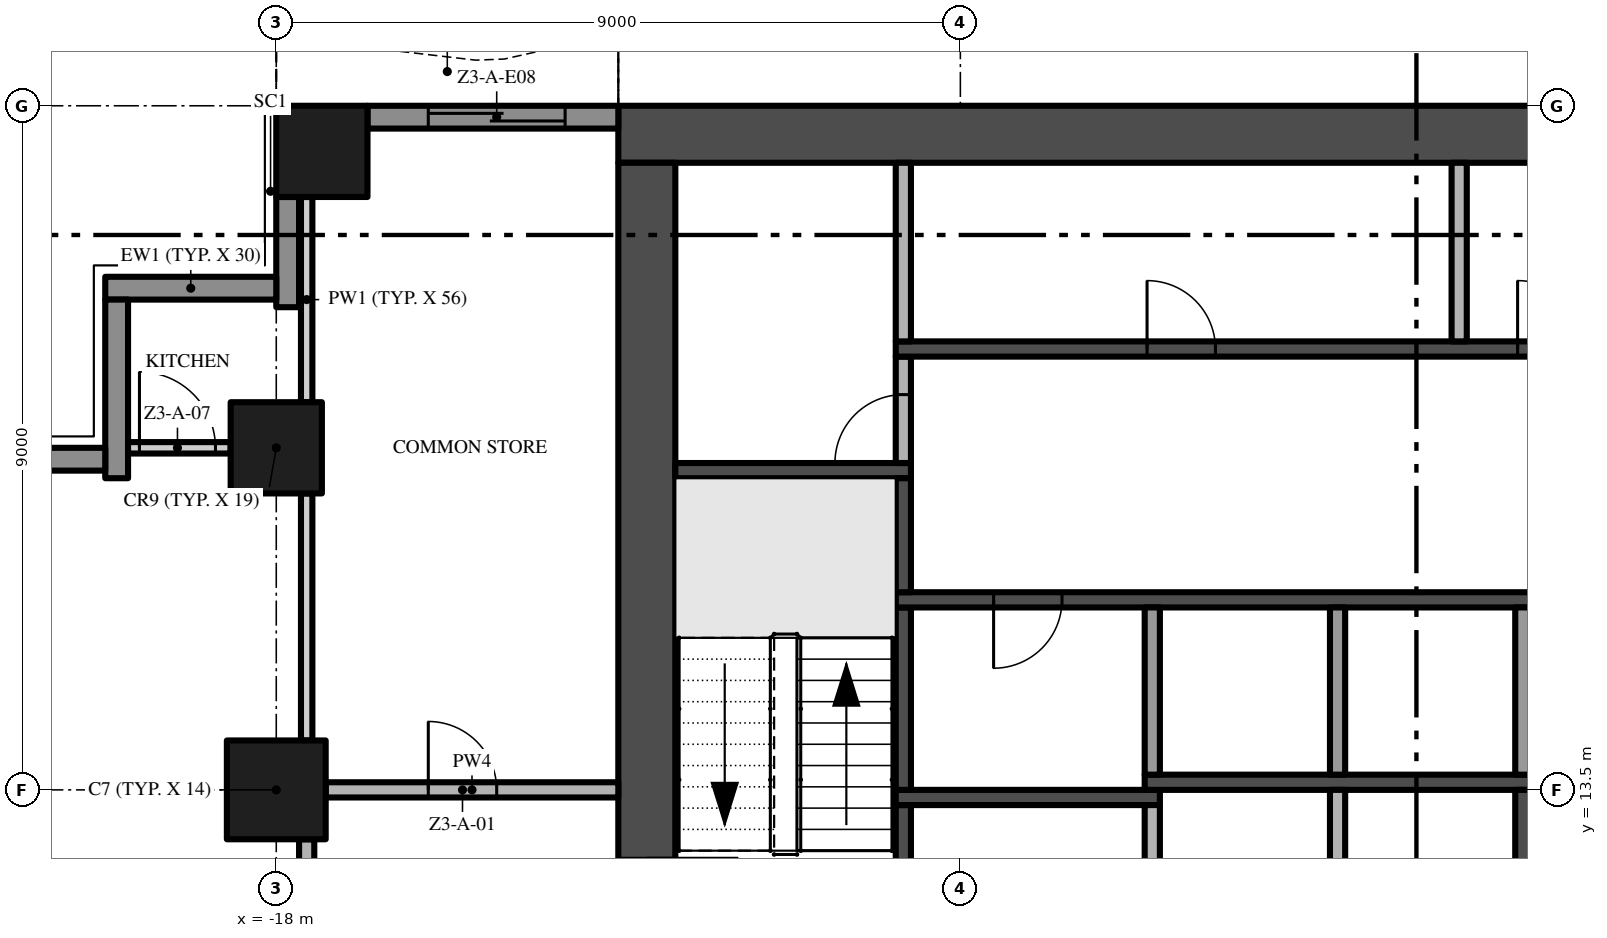
"""IFC4 building model, lengths in metres.
Left out: names, types, materials, properties, quantities, classifications, styles, units other than length and angle.
Written with IfcOpenShell. Run it as: python <this file> out.ifc"""

import sys

from ifc_helpers import new_model, si_unit, direction, frame, frame_2d, origin, origin_2d, place, context, subcontext, project, spatial, polyline, rectangle, outline, extrude, element, fill, save


model = new_model("IFC4")
c1 = context("Model", 3, precision=1e-05, world=origin(), true_north=direction((0.0, 1.0)))
c2 = subcontext(c1, "Body", "Model", "MODEL_VIEW")
j1 = project(units=[si_unit("LENGTHUNIT", "METRE"), si_unit("PLANEANGLEUNIT", "RADIAN")], contexts=[c1])
p1 = place(None, origin())
s1 = spatial("IfcSite", under=j1, at=p1, CompositionType="ELEMENT")
p2 = place(p1, origin())
s2 = spatial("IfcBuilding", under=s1, at=p2, CompositionType="ELEMENT")
p3 = place(p2, frame((0.0, 0.0, 132.6)))
s3 = spatial("IfcBuildingStorey", under=s2, at=p3, CompositionType="ELEMENT", Elevation=132.6)
p4 = place(p3, frame((13.5, 22.125, -0.3), z_axis=(0.0, 0.0, 1.0), x_axis=(-1.0, 0.0, 0.0)))
e1 = element("IfcWall", 1, at=p4, inside=s3, PredefinedType="SHEAR", context=c2, shape_type="SweptSolid", body=[
    extrude(rectangle(XDim=27.0, YDim=0.75, at=frame_2d((13.5, 0.0))), origin(), (0.0, 0.0, 1.0), 3.8),
])
p5 = place(p3, frame((-13.125, 21.75, -0.3), z_axis=(0.0, 0.0, 1.0), x_axis=(0.0, -1.0, 0.0)))
e2 = element("IfcWall", 2, at=p5, inside=s3, PredefinedType="SHEAR", context=c2, shape_type="SweptSolid", body=[
    extrude(rectangle(XDim=16.5, YDim=0.75, at=frame_2d((8.25, 0.0))), origin(), (0.0, 0.0, 1.0), 3.8),
])
p6 = place(p5, frame((9.15, 0.0, 0.3)))
e3 = element("IfcOpeningElement", 3, at=p6, cuts=e2, PredefinedType="OPENING", context=c2, shape_type="SweptSolid", body=[
    extrude(rectangle(XDim=1.2, YDim=2.2, at=frame_2d((0.6, 1.1))), frame((0.0, 0.385, 0.0), z_axis=(0.0, -1.0, 0.0), x_axis=(1.0, 0.0, 0.0)), (0.0, 0.0, 1.0), 0.77),
])
p7 = place(p3, frame((-18.0, 13.5, 0.0), z_axis=(0.0, 0.0, 1.0), x_axis=(1.0, 0.0, 0.0)))
e4 = element("IfcColumn", 4, at=p7, inside=s3, PredefinedType="COLUMN", context=c2, shape_type="SweptSolid", body=[
    extrude(rectangle(XDim=1.3, YDim=1.3, at=origin_2d()), origin(), (0.0, 0.0, 1.0), 3.5),
])
for number, where, z_axis, x_axis in (
    (5, (-17.4, 21.9, 0.0), (0.0, 0.0, 1.0), (1.0, 0.0, 0.0)),
    (6, (-18.0, 18.0, 0.0), (0.0, 0.0, 1.0), (1.0, 0.0, 0.0)),
):
    element("IfcColumn", number, at=place(p3, frame(where, z_axis=z_axis, x_axis=x_axis)), inside=s3, PredefinedType="COLUMN", context=c2, shape_type="SweptSolid", body=[
        extrude(rectangle(XDim=1.2, YDim=1.2, at=origin_2d()), origin(), (0.0, 0.0, 1.0), 3.5),
    ])
p8 = place(p3, frame((-16.8, 22.35, 0.0), z_axis=(0.0, 0.0, 1.0), x_axis=(1.0, 0.0, 0.0)))
e7 = element("IfcWall", 7, at=p8, inside=s3, PredefinedType="SOLIDWALL", context=c2, shape_type="SweptSolid", body=[
    extrude(rectangle(XDim=3.3, YDim=0.3, at=frame_2d((1.65, 0.0))), origin(), (0.0, 0.0, 1.0), 3.5),
])
p9 = place(p8, frame((0.8, 0.0, 0.0)))
e8 = element("IfcOpeningElement", 8, at=p9, cuts=e7, PredefinedType="OPENING", context=c2, shape_type="SweptSolid", body=[
    extrude(rectangle(XDim=1.8, YDim=2.4, at=frame_2d((0.9, 1.2))), frame((0.0, 0.16, 0.0), z_axis=(0.0, -1.0, 0.0), x_axis=(1.0, 0.0, 0.0)), (0.0, 0.0, 1.0), 0.32),
])
p10 = place(p3, frame((-17.85, 19.85, 0.0), z_axis=(0.0, 0.0, 1.0), x_axis=(0.0, 1.0, 0.0)))
e9 = element("IfcWall", 9, at=p10, inside=s3, PredefinedType="SOLIDWALL", context=c2, shape_type="SweptSolid", body=[
    extrude(rectangle(XDim=1.45, YDim=0.3, at=frame_2d((0.725, 0.0))), origin(), (0.0, 0.0, 1.0), 3.5),
])
p11 = place(p3, frame((-20.25, 20.1, 0.0), z_axis=(0.0, 0.0, 1.0), x_axis=(1.0, 0.0, 0.0)))
e10 = element("IfcWall", 10, at=p11, inside=s3, PredefinedType="SOLIDWALL", context=c2, shape_type="SweptSolid", body=[
    extrude(rectangle(XDim=2.25, YDim=0.3, at=frame_2d((1.125, 0.0))), origin(), (0.0, 0.0, 1.0), 3.5),
])
p12 = place(p3, frame((-20.1, 17.6, 0.0), z_axis=(0.0, 0.0, 1.0), x_axis=(0.0, 1.0, 0.0)))
e11 = element("IfcWall", 11, at=p12, inside=s3, PredefinedType="SOLIDWALL", context=c2, shape_type="SweptSolid", body=[
    extrude(rectangle(XDim=2.35, YDim=0.3, at=frame_2d((1.175, 0.0))), origin(), (0.0, 0.0, 1.0), 3.5),
])
p13 = place(p3, frame((-22.5, 17.85, 0.0), z_axis=(0.0, 0.0, 1.0), x_axis=(1.0, 0.0, 0.0)))
e12 = element("IfcWall", 12, at=p13, inside=s3, PredefinedType="SOLIDWALL", context=c2, shape_type="SweptSolid", body=[
    extrude(rectangle(XDim=2.25, YDim=0.3, at=frame_2d((1.125, 0.0))), origin(), (0.0, 0.0, 1.0), 3.5),
])
p14 = place(p3, origin())
e13 = element("IfcWall", 13, at=p14, inside=s3, PredefinedType="USERDEFINED", context=c2, shape_type="SweptSolid", body=[
    extrude(outline(polyline([(-13.5, 23.451), (-15.0, 23.115), (-15.375, 23.1), (-16.5, 23.231), (-18.0, 23.755), (-18.083, 23.519), (-16.556, 22.986), (-15.385, 22.849), (-14.967, 22.866), (-13.445, 23.208), (-13.5, 23.451)])), origin(), (0.0, 0.0, 1.0), 0.9),
])
p15 = place(p3, frame((-12.75, 17.7, 0.0), z_axis=(0.0, 0.0, 1.0), x_axis=(1.0, 0.0, 0.0)))
e14 = element("IfcWall", 14, at=p15, inside=s3, PredefinedType="SHEAR", context=c2, shape_type="SweptSolid", body=[
    extrude(rectangle(XDim=3.1, YDim=0.2, at=frame_2d((1.55, 0.0))), origin(), (0.0, 0.0, 1.0), 3.5),
])
p16 = place(p3, frame((-9.75, 11.0, 0.0), z_axis=(0.0, 0.0, 1.0), x_axis=(0.0, 1.0, 0.0)))
e15 = element("IfcWall", 15, at=p16, inside=s3, PredefinedType="SHEAR", context=c2, shape_type="SweptSolid", body=[
    extrude(rectangle(XDim=2.3, YDim=0.2, at=frame_2d((1.15, 0.0))), origin(), (0.0, 0.0, 1.0), 3.5),
])
p17 = place(p3, frame((-9.85, 13.4, 0.0), z_axis=(0.0, 0.0, 1.0), x_axis=(1.0, 0.0, 0.0)))
e16 = element("IfcWall", 16, at=p17, inside=s3, PredefinedType="SHEAR", context=c2, shape_type="SweptSolid", body=[
    extrude(rectangle(XDim=3.475, YDim=0.2, at=frame_2d((1.738, 0.0))), origin(), (0.0, 0.0, 1.0), 3.5),
])
p18 = place(p3, frame((-9.75, 13.5, 0.0), z_axis=(0.0, 0.0, 1.0), x_axis=(0.0, 1.0, 0.0)))
e17 = element("IfcWall", 17, at=p18, inside=s3, PredefinedType="SHEAR", context=c2, shape_type="SweptSolid", body=[
    extrude(rectangle(XDim=2.4, YDim=0.2, at=frame_2d((1.2, 0.0))), origin(), (0.0, 0.0, 1.0), 3.5),
])
p19 = place(p3, frame((-1.5, 16.0, 0.0), z_axis=(0.0, 0.0, 1.0), x_axis=(-1.0, 0.0, 0.0)))
e18 = element("IfcWall", 18, at=p19, inside=s3, PredefinedType="SHEAR", context=c2, shape_type="SweptSolid", body=[
    extrude(rectangle(XDim=8.35, YDim=0.2, at=frame_2d((4.175, 0.0))), origin(), (0.0, 0.0, 1.0), 3.5),
])
p20 = place(p19, frame((6.162, 0.0, 0.0)))
e19 = element("IfcOpeningElement", 19, at=p20, cuts=e18, PredefinedType="OPENING", context=c2, shape_type="SweptSolid", body=[
    extrude(rectangle(XDim=0.9, YDim=2.1, at=frame_2d((0.45, 1.05))), frame((0.0, 0.11, 0.0), z_axis=(0.0, -1.0, 0.0), x_axis=(1.0, 0.0, 0.0)), (0.0, 0.0, 1.0), 0.22),
])
p21 = place(p3, frame((-9.75, 16.1, 0.0), z_axis=(0.0, 0.0, 1.0), x_axis=(0.0, 1.0, 0.0)))
e20 = element("IfcWall", 20, at=p21, inside=s3, PredefinedType="SHEAR", context=c2, shape_type="SweptSolid", body=[
    extrude(rectangle(XDim=1.5, YDim=0.2, at=frame_2d((0.75, 0.0))), origin(), (0.0, 0.0, 1.0), 3.5),
])
p22 = place(p3, frame((-9.75, 17.8, 0.0), z_axis=(0.0, 0.0, 1.0), x_axis=(0.0, 1.0, 0.0)))
e21 = element("IfcWall", 21, at=p22, inside=s3, PredefinedType="PARTITIONING", context=c2, shape_type="SweptSolid", body=[
    extrude(rectangle(XDim=1.4, YDim=0.2, at=frame_2d((0.7, 0.0))), origin(), (0.0, 0.0, 1.0), 3.5),
])
p23 = place(p22, origin())
e22 = element("IfcOpeningElement", 22, at=p23, cuts=e21, PredefinedType="OPENING", context=c2, shape_type="SweptSolid", body=[
    extrude(rectangle(XDim=0.9, YDim=2.1, at=frame_2d((0.45, 1.05))), frame((0.0, 0.11, 0.0), z_axis=(0.0, -1.0, 0.0), x_axis=(1.0, 0.0, 0.0)), (0.0, 0.0, 1.0), 0.22),
])
p24 = place(p3, frame((-9.85, 19.3, 0.0), z_axis=(0.0, 0.0, 1.0), x_axis=(1.0, 0.0, 0.0)))
e23 = element("IfcWall", 23, at=p24, inside=s3, PredefinedType="SHEAR", context=c2, shape_type="SweptSolid", body=[
    extrude(rectangle(XDim=19.7, YDim=0.2, at=frame_2d((9.85, 0.0))), origin(), (0.0, 0.0, 1.0), 3.5),
])
p25 = place(p24, frame((10.519, 0.0, 0.0)))
e24 = element("IfcOpeningElement", 24, at=p25, cuts=e23, PredefinedType="OPENING", context=c2, shape_type="SweptSolid", body=[
    extrude(rectangle(XDim=1.1, YDim=2.1, at=frame_2d((0.55, 1.05))), frame((0.0, 0.11, 0.0), z_axis=(0.0, -1.0, 0.0), x_axis=(1.0, 0.0, 0.0)), (0.0, 0.0, 1.0), 0.22),
])
p26 = place(p24, frame((12.956, 0.0, 0.0)))
e25 = element("IfcOpeningElement", 25, at=p26, cuts=e23, PredefinedType="OPENING", context=c2, shape_type="SweptSolid", body=[
    extrude(rectangle(XDim=1.1, YDim=2.1, at=frame_2d((0.55, 1.05))), frame((0.0, 0.11, 0.0), z_axis=(0.0, -1.0, 0.0), x_axis=(1.0, 0.0, 0.0)), (0.0, 0.0, 1.0), 0.22),
])
p27 = place(p24, frame((15.394, 0.0, 0.0)))
e26 = element("IfcOpeningElement", 26, at=p27, cuts=e23, PredefinedType="OPENING", context=c2, shape_type="SweptSolid", body=[
    extrude(rectangle(XDim=1.1, YDim=2.1, at=frame_2d((0.55, 1.05))), frame((0.0, 0.11, 0.0), z_axis=(0.0, -1.0, 0.0), x_axis=(1.0, 0.0, 0.0)), (0.0, 0.0, 1.0), 0.22),
])
p28 = place(p24, frame((17.831, 0.0, 0.0)))
e27 = element("IfcOpeningElement", 27, at=p28, cuts=e23, PredefinedType="OPENING", context=c2, shape_type="SweptSolid", body=[
    extrude(rectangle(XDim=1.1, YDim=2.1, at=frame_2d((0.55, 1.05))), frame((0.0, 0.11, 0.0), z_axis=(0.0, -1.0, 0.0), x_axis=(1.0, 0.0, 0.0)), (0.0, 0.0, 1.0), 0.22),
])
p29 = place(p24, frame((3.306, 0.0, 0.0)))
e28 = element("IfcOpeningElement", 28, at=p29, cuts=e23, PredefinedType="OPENING", context=c2, shape_type="SweptSolid", body=[
    extrude(rectangle(XDim=0.9, YDim=2.1, at=frame_2d((0.45, 1.05))), frame((0.0, 0.11, 0.0), z_axis=(0.0, -1.0, 0.0), x_axis=(1.0, 0.0, 0.0)), (0.0, 0.0, 1.0), 0.22),
])
p30 = place(p24, frame((8.181, 0.0, 0.0)))
e29 = element("IfcOpeningElement", 29, at=p30, cuts=e23, PredefinedType="OPENING", context=c2, shape_type="SweptSolid", body=[
    extrude(rectangle(XDim=0.9, YDim=2.1, at=frame_2d((0.45, 1.05))), frame((0.0, 0.11, 0.0), z_axis=(0.0, -1.0, 0.0), x_axis=(1.0, 0.0, 0.0)), (0.0, 0.0, 1.0), 0.22),
])
p31 = place(p3, frame((-9.75, 19.4, 0.0), z_axis=(0.0, 0.0, 1.0), x_axis=(0.0, 1.0, 0.0)))
e30 = element("IfcWall", 30, at=p31, inside=s3, PredefinedType="PARTITIONING", context=c2, shape_type="SweptSolid", body=[
    extrude(rectangle(XDim=2.35, YDim=0.2, at=frame_2d((1.175, 0.0))), origin(), (0.0, 0.0, 1.0), 3.5),
])
p32 = place(p3, frame((-6.475, 11.0, 0.0), z_axis=(0.0, 0.0, 1.0), x_axis=(0.0, 1.0, 0.0)))
e31 = element("IfcWall", 31, at=p32, inside=s3, PredefinedType="PARTITIONING", context=c2, shape_type="SweptSolid", body=[
    extrude(rectangle(XDim=2.3, YDim=0.2, at=frame_2d((1.15, 0.0))), origin(), (0.0, 0.0, 1.0), 3.5),
])
p33 = place(p3, frame((-6.575, 13.6, 0.0), z_axis=(0.0, 0.0, 1.0), x_axis=(1.0, 0.0, 0.0)))
e32 = element("IfcWall", 32, at=p33, inside=s3, PredefinedType="SHEAR", context=c2, shape_type="SweptSolid", body=[
    extrude(rectangle(XDim=5.075, YDim=0.2, at=frame_2d((2.538, 0.0))), origin(), (0.0, 0.0, 1.0), 3.5),
])
p34 = place(p3, frame((-6.475, 13.7, 0.0), z_axis=(0.0, 0.0, 1.0), x_axis=(0.0, 1.0, 0.0)))
e33 = element("IfcWall", 33, at=p34, inside=s3, PredefinedType="PARTITIONING", context=c2, shape_type="SweptSolid", body=[
    extrude(rectangle(XDim=2.2, YDim=0.2, at=frame_2d((1.1, 0.0))), origin(), (0.0, 0.0, 1.0), 3.5),
])
p35 = place(p3, frame((-4.037, 8.15, 0.0), z_axis=(0.0, 0.0, 1.0), x_axis=(0.0, 1.0, 0.0)))
e34 = element("IfcWall", 34, at=p35, inside=s3, PredefinedType="PARTITIONING", context=c2, shape_type="SweptSolid", body=[
    extrude(rectangle(XDim=5.35, YDim=0.2, at=frame_2d((2.675, 0.0))), origin(), (0.0, 0.0, 1.0), 3.5),
])
p36 = place(p35, frame((2.225, 0.0, 0.0)))
e35 = element("IfcOpeningElement", 35, at=p36, cuts=e34, PredefinedType="OPENING", context=c2, shape_type="SweptSolid", body=[
    extrude(rectangle(XDim=0.9, YDim=2.1, at=frame_2d((0.45, 1.05))), frame((0.0, 0.11, 0.0), z_axis=(0.0, -1.0, 0.0), x_axis=(1.0, 0.0, 0.0)), (0.0, 0.0, 1.0), 0.22),
])
p37 = place(p3, frame((-4.037, 13.7, 0.0), z_axis=(0.0, 0.0, 1.0), x_axis=(0.0, 1.0, 0.0)))
e36 = element("IfcWall", 36, at=p37, inside=s3, PredefinedType="PARTITIONING", context=c2, shape_type="SweptSolid", body=[
    extrude(rectangle(XDim=2.2, YDim=0.2, at=frame_2d((1.1, 0.0))), origin(), (0.0, 0.0, 1.0), 3.5),
])
p38 = place(p3, frame((-2.438, 19.4, 0.0), z_axis=(0.0, 0.0, 1.0), x_axis=(0.0, 1.0, 0.0)))
e37 = element("IfcWall", 37, at=p38, inside=s3, PredefinedType="PARTITIONING", context=c2, shape_type="SweptSolid", body=[
    extrude(rectangle(XDim=2.35, YDim=0.2, at=frame_2d((1.175, 0.0))), origin(), (0.0, 0.0, 1.0), 3.5),
])
p39 = place(p3, frame((-1.6, 8.15, 0.0), z_axis=(0.0, 0.0, 1.0), x_axis=(0.0, 1.0, 0.0)))
e38 = element("IfcWall", 38, at=p39, inside=s3, PredefinedType="SHEAR", context=c2, shape_type="SweptSolid", body=[
    extrude(rectangle(XDim=5.35, YDim=0.2, at=frame_2d((2.675, 0.0))), origin(), (0.0, 0.0, 1.0), 3.5),
])
p40 = place(p39, frame((2.225, 0.0, 0.0)))
e39 = element("IfcOpeningElement", 39, at=p40, cuts=e38, PredefinedType="OPENING", context=c2, shape_type="SweptSolid", body=[
    extrude(rectangle(XDim=0.9, YDim=2.1, at=frame_2d((0.45, 1.05))), frame((0.0, 0.11, 0.0), z_axis=(0.0, -1.0, 0.0), x_axis=(1.0, 0.0, 0.0)), (0.0, 0.0, 1.0), 0.22),
])
p41 = place(p3, frame((-1.6, 13.7, 0.0), z_axis=(0.0, 0.0, 1.0), x_axis=(0.0, 1.0, 0.0)))
e40 = element("IfcWall", 40, at=p41, inside=s3, PredefinedType="PARTITIONING", context=c2, shape_type="SweptSolid", body=[
    extrude(rectangle(XDim=2.2, YDim=0.2, at=frame_2d((1.1, 0.0))), origin(), (0.0, 0.0, 1.0), 3.5),
])
p42 = place(p3, frame((-17.35, 13.5, 0.0), z_axis=(0.0, 0.0, 1.0), x_axis=(1.0, 0.0, 0.0)))
e41 = element("IfcWall", 41, at=p42, inside=s3, PredefinedType="PARTITIONING", context=c2, shape_type="SweptSolid", body=[
    extrude(rectangle(XDim=3.85, YDim=0.2, at=frame_2d((1.925, 0.0))), origin(), (0.0, 0.0, 1.0), 3.5),
])
p43 = place(p42, frame((1.35, 0.0, 0.0)))
e42 = element("IfcOpeningElement", 42, at=p43, cuts=e41, PredefinedType="OPENING", context=c2, shape_type="SweptSolid", body=[
    extrude(rectangle(XDim=0.9, YDim=2.1, at=frame_2d((0.45, 1.05))), frame((0.0, 0.11, 0.0), z_axis=(0.0, -1.0, 0.0), x_axis=(1.0, 0.0, 0.0)), (0.0, 0.0, 1.0), 0.22),
])
p44 = place(p3, frame((-19.95, 18.0, 0.0), z_axis=(0.0, 0.0, 1.0), x_axis=(1.0, 0.0, 0.0)))
e43 = element("IfcWall", 43, at=p44, inside=s3, PredefinedType="PARTITIONING", context=c2, shape_type="SweptSolid", body=[
    extrude(rectangle(XDim=1.35, YDim=0.15, at=frame_2d((0.675, 0.0))), origin(), (0.0, 0.0, 1.0), 3.5),
])
p45 = place(p44, frame((0.15, 0.0, 0.0)))
e44 = element("IfcOpeningElement", 44, at=p45, cuts=e43, PredefinedType="OPENING", context=c2, shape_type="SweptSolid", body=[
    extrude(rectangle(XDim=1.0, YDim=2.4, at=frame_2d((0.5, 1.2))), frame((0.0, 0.085, 0.0), z_axis=(0.0, -1.0, 0.0), x_axis=(1.0, 0.0, 0.0)), (0.0, 0.0, 1.0), 0.17),
])
p46 = place(p3, frame((-17.6, 5.15, 0.0), z_axis=(0.0, 0.0, 1.0), x_axis=(0.0, 1.0, 0.0)))
e45 = element("IfcWall", 45, at=p46, inside=s3, PredefinedType="PARTITIONING", context=c2, shape_type="SweptSolid", body=[
    extrude(rectangle(XDim=7.7, YDim=0.2, at=frame_2d((3.85, 0.0))), origin(), (0.0, 0.0, 1.0), 3.5),
])
p47 = place(p46, frame((1.0, 0.0, 0.0)))
e46 = element("IfcOpeningElement", 46, at=p47, cuts=e45, PredefinedType="OPENING", context=c2, shape_type="SweptSolid", body=[
    extrude(rectangle(XDim=1.2, YDim=2.4, at=frame_2d((0.6, 1.2))), frame((0.0, 0.11, 0.0), z_axis=(0.0, -1.0, 0.0), x_axis=(1.0, 0.0, 0.0)), (0.0, 0.0, 1.0), 0.22),
])
p48 = place(p3, frame((-17.6, 14.15, 0.0), z_axis=(0.0, 0.0, 1.0), x_axis=(0.0, 1.0, 0.0)))
e47 = element("IfcWall", 47, at=p48, inside=s3, PredefinedType="PARTITIONING", context=c2, shape_type="SweptSolid", body=[
    extrude(rectangle(XDim=3.25, YDim=0.15, at=frame_2d((1.625, 0.0))), origin(), (0.0, 0.0, 1.0), 3.5),
])
p49 = place(p3, frame((-17.6, 18.6, 0.0), z_axis=(0.0, 0.0, 1.0), x_axis=(0.0, 1.0, 0.0)))
e48 = element("IfcWall", 48, at=p49, inside=s3, PredefinedType="PARTITIONING", context=c2, shape_type="SweptSolid", body=[
    extrude(rectangle(XDim=2.7, YDim=0.15, at=frame_2d((1.35, 0.0))), origin(), (0.0, 0.0, 1.0), 3.5),
])
p50 = place(p9, origin())
e49 = element("IfcDoor", 49, at=p50, inside=s3, OperationType="SINGLE_SWING_LEFT", PredefinedType="DOOR", context=c2, shape_type="SweptSolid", body=[
    extrude(rectangle(XDim=1.8, YDim=2.4, at=frame_2d((0.9, 1.2))), frame((0.0, 0.025, 0.0), z_axis=(0.0, -1.0, 0.0), x_axis=(1.0, 0.0, 0.0)), (0.0, 0.0, 1.0), 0.05),
])
fill(e8, e49)
p51 = place(p20, origin())
e50 = element("IfcDoor", 50, at=p51, inside=s3, OperationType="SINGLE_SWING_RIGHT", PredefinedType="DOOR", context=c2, shape_type="SweptSolid", body=[
    extrude(rectangle(XDim=0.9, YDim=2.1, at=frame_2d((0.45, 1.05))), frame((0.0, 0.025, 0.0), z_axis=(0.0, -1.0, 0.0), x_axis=(1.0, 0.0, 0.0)), (0.0, 0.0, 1.0), 0.05),
])
fill(e19, e50)
p52 = place(p23, origin())
e51 = element("IfcDoor", 51, at=p52, inside=s3, OperationType="SINGLE_SWING_LEFT", PredefinedType="DOOR", context=c2, shape_type="SweptSolid", body=[
    extrude(rectangle(XDim=0.9, YDim=2.1, at=frame_2d((0.45, 1.05))), frame((0.0, 0.025, 0.0), z_axis=(0.0, -1.0, 0.0), x_axis=(1.0, 0.0, 0.0)), (0.0, 0.0, 1.0), 0.05),
])
fill(e22, e51)
p53 = place(p29, origin())
e52 = element("IfcDoor", 52, at=p53, inside=s3, OperationType="SINGLE_SWING_LEFT", PredefinedType="DOOR", context=c2, shape_type="SweptSolid", body=[
    extrude(rectangle(XDim=0.9, YDim=2.1, at=frame_2d((0.45, 1.05))), frame((0.0, 0.025, 0.0), z_axis=(0.0, -1.0, 0.0), x_axis=(1.0, 0.0, 0.0)), (0.0, 0.0, 1.0), 0.05),
])
fill(e28, e52)
p54 = place(p30, origin())
e53 = element("IfcDoor", 53, at=p54, inside=s3, OperationType="SINGLE_SWING_LEFT", PredefinedType="DOOR", context=c2, shape_type="SweptSolid", body=[
    extrude(rectangle(XDim=0.9, YDim=2.1, at=frame_2d((0.45, 1.05))), frame((0.0, 0.025, 0.0), z_axis=(0.0, -1.0, 0.0), x_axis=(1.0, 0.0, 0.0)), (0.0, 0.0, 1.0), 0.05),
])
fill(e29, e53)
p55 = place(p43, origin())
e54 = element("IfcDoor", 54, at=p55, inside=s3, OperationType="SINGLE_SWING_LEFT", PredefinedType="DOOR", context=c2, shape_type="SweptSolid", body=[
    extrude(rectangle(XDim=0.9, YDim=2.1, at=frame_2d((0.45, 1.05))), frame((0.0, 0.025, 0.0), z_axis=(0.0, -1.0, 0.0), x_axis=(1.0, 0.0, 0.0)), (0.0, 0.0, 1.0), 0.05),
])
fill(e42, e54)
p56 = place(p45, origin())
e55 = element("IfcDoor", 55, at=p56, inside=s3, OperationType="SINGLE_SWING_LEFT", PredefinedType="DOOR", context=c2, shape_type="SweptSolid", body=[
    extrude(rectangle(XDim=1.0, YDim=2.4, at=frame_2d((0.5, 1.2))), frame((0.0, 0.025, 0.0), z_axis=(0.0, -1.0, 0.0), x_axis=(1.0, 0.0, 0.0)), (0.0, 0.0, 1.0), 0.05),
])
fill(e44, e55)
save(model, sys.argv[1])
